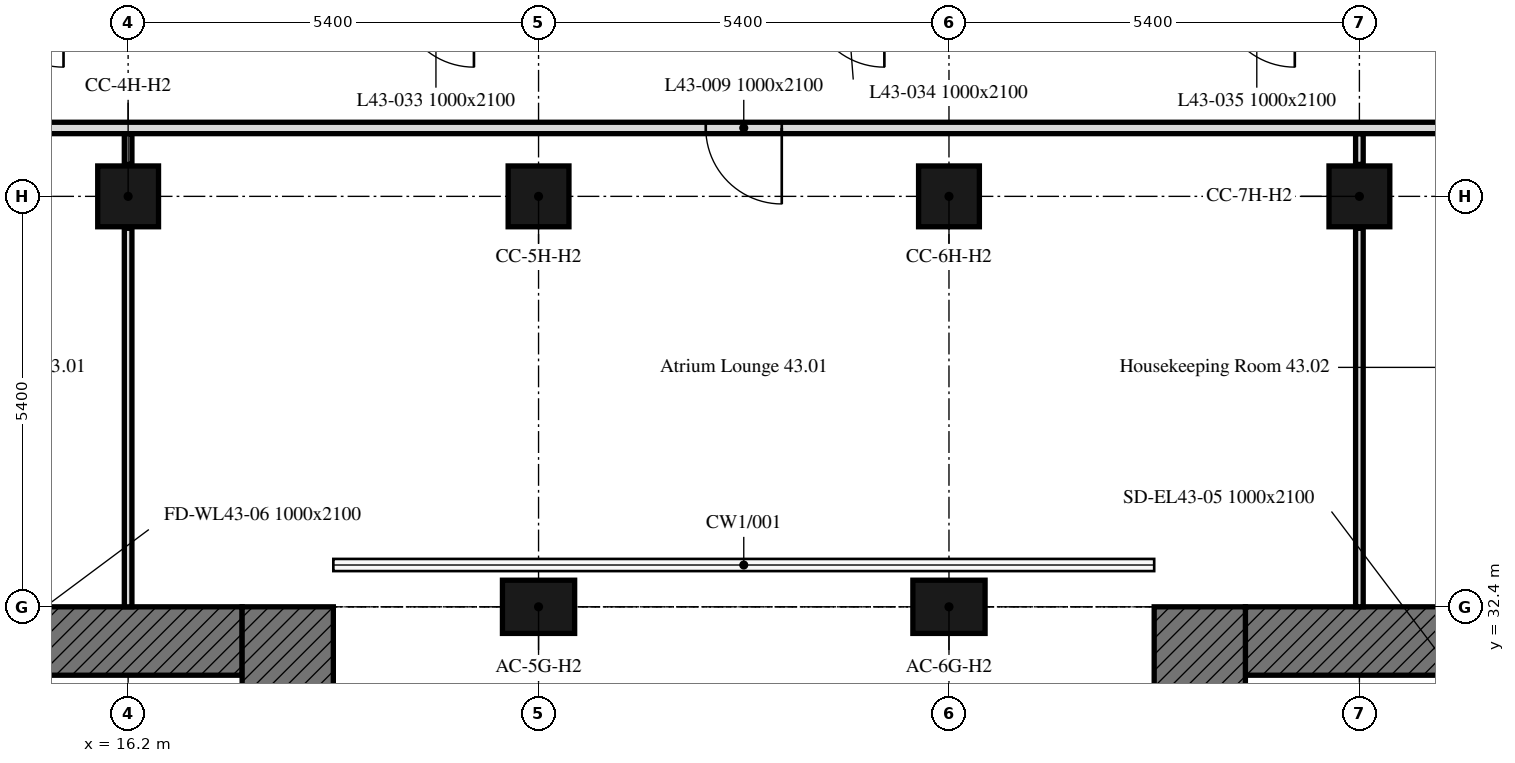
"""IFC4 building model, lengths in metres.
Left out: names, types, materials, properties, quantities, classifications, styles, units other than length and angle.
Written with IfcOpenShell. Run it as: python <this file> out.ifc"""

import sys

from ifc_helpers import new_model, si_unit, direction, frame, frame_2d, origin, origin_2d, place, context, subcontext, project, spatial, rectangle, extrude, element, fill, save


model = new_model("IFC4")
c1 = context("Model", 3, precision=1e-05, world=origin(), true_north=direction((0.0, 1.0)))
c2 = subcontext(c1, "Body", "Model", "MODEL_VIEW")
j1 = project(units=[si_unit("LENGTHUNIT", "METRE"), si_unit("PLANEANGLEUNIT", "RADIAN")], contexts=[c1])
p1 = place(None, origin())
s1 = spatial("IfcSite", under=j1, at=p1, CompositionType="ELEMENT")
p2 = place(p1, origin())
s2 = spatial("IfcBuilding", under=s1, at=p2, CompositionType="ELEMENT")
p3 = place(p2, frame((0.0, 0.0, 180.7)))
s3 = spatial("IfcBuildingStorey", under=s2, at=p3, CompositionType="ELEMENT", Elevation=180.7)
for number, where, z_axis, x_axis in (
    (1, (21.6, 32.4, 0.0), (0.0, 0.0, 1.0), (1.0, 0.0, 0.0)),
    (2, (27.0, 32.4, 0.0), (0.0, 0.0, 1.0), (1.0, 0.0, 0.0)),
):
    element("IfcColumn", number, at=place(p3, frame(where, z_axis=z_axis, x_axis=x_axis)), inside=s3, PredefinedType="COLUMN", context=c2, shape_type="SweptSolid", body=[
        extrude(rectangle(XDim=0.95, YDim=0.7, at=origin_2d()), origin(), (0.0, 0.0, 1.0), 3.0),
    ])
for number, where, z_axis, x_axis in (
    (3, (16.2, 37.8, 0.0), (0.0, 0.0, 1.0), (1.0, 0.0, 0.0)),
    (4, (21.6, 37.8, 0.0), (0.0, 0.0, 1.0), (1.0, 0.0, 0.0)),
    (5, (27.0, 37.8, 0.0), (0.0, 0.0, 1.0), (1.0, 0.0, 0.0)),
    (6, (32.4, 37.8, 0.0), (0.0, 0.0, 1.0), (1.0, 0.0, 0.0)),
):
    element("IfcColumn", number, at=place(p3, frame(where, z_axis=z_axis, x_axis=x_axis)), inside=s3, PredefinedType="COLUMN", context=c2, shape_type="SweptSolid", body=[
        extrude(rectangle(XDim=0.8, YDim=0.8, at=origin_2d()), origin(), (0.0, 0.0, 1.0), 3.0),
    ])
p4 = place(p3, frame((6.6, 31.95, 0.0), z_axis=(0.0, 0.0, 1.0), x_axis=(1.0, 0.0, 0.0)))
e7 = element("IfcWall", 7, at=p4, inside=s3, PredefinedType="SOLIDWALL", context=c2, shape_type="SweptSolid", body=[
    extrude(rectangle(XDim=11.1, YDim=0.9, at=frame_2d((5.55, 0.0))), origin(), (0.0, 0.0, 1.0), 3.0),
])
p5 = place(p4, frame((3.55, 0.0, 0.0)))
e8 = element("IfcOpeningElement", 8, at=p5, cuts=e7, PredefinedType="OPENING", context=c2, shape_type="SweptSolid", body=[
    extrude(rectangle(XDim=2.0, YDim=2.4, at=frame_2d((1.0, 1.2))), frame((0.0, 0.45, 0.0), z_axis=(0.0, -1.0, 0.0), x_axis=(1.0, 0.0, 0.0)), (0.0, 0.0, 1.0), 0.9),
])
p6 = place(p3, frame((18.3, 32.4, 0.0), z_axis=(0.0, 0.0, 1.0), x_axis=(0.0, -1.0, 0.0)))
e9 = element("IfcWall", 9, at=p6, inside=s3, PredefinedType="SOLIDWALL", context=c2, shape_type="SweptSolid", body=[
    extrude(rectangle(XDim=16.2, YDim=1.2, at=frame_2d((8.1, 0.0))), origin(), (0.0, 0.0, 1.0), 3.0),
])
p7 = place(p3, frame((30.9, 31.95, 0.0), z_axis=(0.0, 0.0, 1.0), x_axis=(1.0, 0.0, 0.0)))
e10 = element("IfcWall", 10, at=p7, inside=s3, PredefinedType="SOLIDWALL", context=c2, shape_type="SweptSolid", body=[
    extrude(rectangle(XDim=11.1, YDim=0.9, at=frame_2d((5.55, 0.0))), origin(), (0.0, 0.0, 1.0), 3.0),
])
p8 = place(p7, frame((5.55, 0.0, 0.0)))
e11 = element("IfcOpeningElement", 11, at=p8, cuts=e10, PredefinedType="OPENING", context=c2, shape_type="SweptSolid", body=[
    extrude(rectangle(XDim=2.0, YDim=2.4, at=frame_2d((1.0, 1.2))), frame((0.0, 0.45, 0.0), z_axis=(0.0, -1.0, 0.0), x_axis=(1.0, 0.0, 0.0)), (0.0, 0.0, 1.0), 0.9),
])
p9 = place(p3, frame((30.3, 16.2, 0.0), z_axis=(0.0, 0.0, 1.0), x_axis=(0.0, 1.0, 0.0)))
e12 = element("IfcWall", 12, at=p9, inside=s3, PredefinedType="SOLIDWALL", context=c2, shape_type="SweptSolid", body=[
    extrude(rectangle(XDim=16.2, YDim=1.2, at=frame_2d((8.1, 0.0))), origin(), (0.0, 0.0, 1.0), 3.0),
])
p10 = place(p3, frame((32.4, 32.4, 0.0), z_axis=(0.0, 0.0, 1.0), x_axis=(0.0, 1.0, 0.0)))
e13 = element("IfcWall", 13, at=p10, inside=s3, PredefinedType="PARTITIONING", context=c2, shape_type="SweptSolid", body=[
    extrude(rectangle(XDim=4.98, YDim=0.1, at=frame_2d((2.49, 0.0))), origin(), (0.0, 0.0, 1.0), 2.4),
])
for number, where, z_axis, x_axis in (
    (14, (32.4, 38.22, 0.0), (0.0, 0.0, 1.0), (0.0, 1.0, 0.0)),
    (15, (16.2, 38.625, 0.0), (0.0, 0.0, 1.0), (0.0, -1.0, 0.0)),
):
    element("IfcWall", number, at=place(p3, frame(where, z_axis=z_axis, x_axis=x_axis)), inside=s3, PredefinedType="PARTITIONING", context=c2, shape_type="SweptSolid", body=[
        extrude(rectangle(XDim=0.405, YDim=0.1, at=frame_2d((0.203, 0.0))), origin(), (0.0, 0.0, 1.0), 2.4),
    ])
p11 = place(p3, frame((16.2, 37.38, 0.0), z_axis=(0.0, 0.0, 1.0), x_axis=(0.0, -1.0, 0.0)))
e16 = element("IfcWall", 16, at=p11, inside=s3, PredefinedType="PARTITIONING", context=c2, shape_type="SweptSolid", body=[
    extrude(rectangle(XDim=4.98, YDim=0.1, at=frame_2d((2.49, 0.0))), origin(), (0.0, 0.0, 1.0), 2.4),
])
p12 = place(p3, frame((43.275, 38.7, 0.0), z_axis=(0.0, 0.0, 1.0), x_axis=(-1.0, 0.0, 0.0)))
e17 = element("IfcWall", 17, at=p12, inside=s3, PredefinedType="PARTITIONING", context=c2, shape_type="SweptSolid", body=[
    extrude(rectangle(XDim=37.124, YDim=0.15, at=frame_2d((18.562, 0.0))), origin(), (0.0, 0.0, 1.0), 2.4),
])
p13 = place(p12, frame((18.475, 0.0, 0.0)))
e18 = element("IfcOpeningElement", 18, at=p13, cuts=e17, PredefinedType="OPENING", context=c2, shape_type="SweptSolid", body=[
    extrude(rectangle(XDim=1.0, YDim=2.1, at=frame_2d((0.5, 1.05))), frame((0.0, 0.075, 0.0), z_axis=(0.0, -1.0, 0.0), x_axis=(1.0, 0.0, 0.0)), (0.0, 0.0, 1.0), 0.15),
])
p14 = place(p12, frame((34.715, 0.0, 0.0)))
e19 = element("IfcOpeningElement", 19, at=p14, cuts=e17, PredefinedType="OPENING", context=c2, shape_type="SweptSolid", body=[
    extrude(rectangle(XDim=1.0, YDim=2.1, at=frame_2d((0.5, 1.05))), frame((0.0, 0.075, 0.0), z_axis=(0.0, -1.0, 0.0), x_axis=(1.0, 0.0, 0.0)), (0.0, 0.0, 1.0), 0.15),
])
p15 = place(p12, frame((7.925, 0.0, 0.0)))
e20 = element("IfcOpeningElement", 20, at=p15, cuts=e17, PredefinedType="OPENING", context=c2, shape_type="SweptSolid", body=[
    extrude(rectangle(XDim=1.0, YDim=2.1, at=frame_2d((0.5, 1.05))), frame((0.0, 0.075, 0.0), z_axis=(0.0, -1.0, 0.0), x_axis=(1.0, 0.0, 0.0)), (0.0, 0.0, 1.0), 0.15),
])
p16 = place(p12, frame((29.025, 0.0, 0.0)))
e21 = element("IfcOpeningElement", 21, at=p16, cuts=e17, PredefinedType="OPENING", context=c2, shape_type="SweptSolid", body=[
    extrude(rectangle(XDim=1.0, YDim=2.1, at=frame_2d((0.5, 1.05))), frame((0.0, 0.075, 0.0), z_axis=(0.0, -1.0, 0.0), x_axis=(1.0, 0.0, 0.0)), (0.0, 0.0, 1.0), 0.15),
])
p17 = place(p12, frame((30.495, 0.0, 0.0)))
e22 = element("IfcOpeningElement", 22, at=p17, cuts=e17, PredefinedType="OPENING", context=c2, shape_type="SweptSolid", body=[
    extrude(rectangle(XDim=1.0, YDim=2.1, at=frame_2d((0.5, 1.05))), frame((0.0, 0.075, 0.0), z_axis=(0.0, -1.0, 0.0), x_axis=(1.0, 0.0, 0.0)), (0.0, 0.0, 1.0), 0.15),
])
p18 = place(p12, frame((6.455, 0.0, 0.0)))
e23 = element("IfcOpeningElement", 23, at=p18, cuts=e17, PredefinedType="OPENING", context=c2, shape_type="SweptSolid", body=[
    extrude(rectangle(XDim=1.0, YDim=2.1, at=frame_2d((0.5, 1.05))), frame((0.0, 0.075, 0.0), z_axis=(0.0, -1.0, 0.0), x_axis=(1.0, 0.0, 0.0)), (0.0, 0.0, 1.0), 0.15),
])
p19 = place(p13, origin())
e24 = element("IfcDoor", 24, at=p19, inside=s3, OperationType="SINGLE_SWING_RIGHT", PredefinedType="DOOR", context=c2, shape_type="SweptSolid", body=[
    extrude(rectangle(XDim=1.0, YDim=2.1, at=frame_2d((0.5, 1.05))), frame((0.0, 0.025, 0.0), z_axis=(0.0, -1.0, 0.0), x_axis=(1.0, 0.0, 0.0)), (0.0, 0.0, 1.0), 0.05),
])
fill(e18, e24)
save(model, sys.argv[1])
